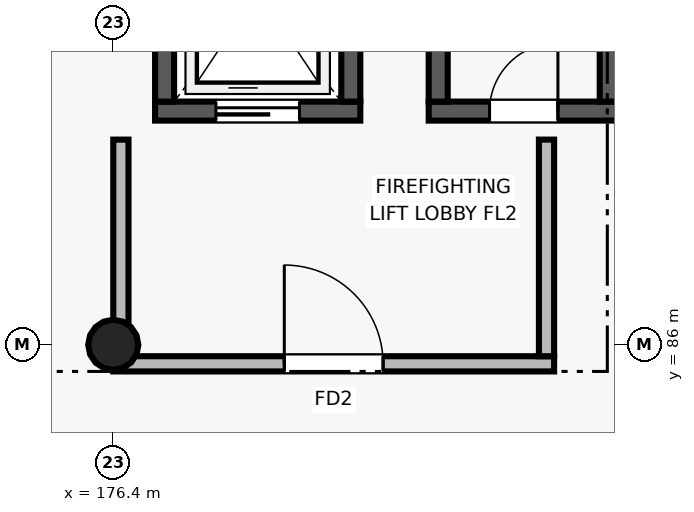
"""IFC4 building model, lengths in metres.
Left out: names, types, materials, properties, quantities, classifications, styles, units other than length and angle.
Written with IfcOpenShell. Run it as: python <this file> out.ifc"""

import sys

from ifc_helpers import new_model, si_unit, direction, frame, frame_2d, origin, origin_2d, place, context, subcontext, project, spatial, rectangle, circle, extrude, element, fill, save


model = new_model("IFC4")
c1 = context("Model", 3, precision=1e-05, world=origin(), true_north=direction((0.0, 1.0)))
c2 = subcontext(c1, "Body", "Model", "MODEL_VIEW")
j1 = project(units=[si_unit("LENGTHUNIT", "METRE"), si_unit("PLANEANGLEUNIT", "RADIAN")], contexts=[c1])
p1 = place(None, origin())
s1 = spatial("IfcSite", under=j1, at=p1, CompositionType="ELEMENT")
p2 = place(p1, origin())
s2 = spatial("IfcBuilding", under=s1, at=p2, CompositionType="ELEMENT")
p3 = place(p2, frame((0.0, 0.0, 9.0)))
s3 = spatial("IfcBuildingStorey", under=s2, at=p3, CompositionType="ELEMENT", Elevation=9.0)
p4 = place(p3, frame((176.4, 86.0, 0.0), z_axis=(0.0, 0.0, 1.0), x_axis=(1.0, 0.0, 0.0)))
e1 = element("IfcColumn", 1, at=p4, inside=s3, PredefinedType="COLUMN", context=c2, shape_type="SweptSolid", body=[
    extrude(circle(Radius=0.33, at=origin_2d()), origin(), (0.0, 0.0, 1.0), 4.2),
])
p5 = place(p3, frame((176.95, 89.075, 0.0), z_axis=(0.0, 0.0, 1.0), x_axis=(1.0, 0.0, 0.0)))
e2 = element("IfcWall", 2, at=p5, inside=s3, PredefinedType="SHEAR", context=c2, shape_type="SweptSolid", body=[
    extrude(rectangle(XDim=2.7, YDim=0.25, at=frame_2d((1.35, 0.0))), origin(), (0.0, 0.0, 1.0), 3.92),
])
p6 = place(p5, frame((0.8, 0.0, 0.0)))
e3 = element("IfcOpeningElement", 3, at=p6, cuts=e2, PredefinedType="OPENING", context=c2, shape_type="SweptSolid", body=[
    extrude(rectangle(XDim=1.1, YDim=2.15, at=frame_2d((0.55, 1.075))), frame((0.0, 0.135, 0.0), z_axis=(0.0, -1.0, 0.0), x_axis=(1.0, 0.0, 0.0)), (0.0, 0.0, 1.0), 0.27),
])
for number, where, z_axis, x_axis in (
    (4, (177.075, 89.2, 0.0), (0.0, 0.0, 1.0), (0.0, 1.0, 0.0)),
    (5, (179.525, 89.2, 0.0), (0.0, 0.0, 1.0), (0.0, 1.0, 0.0)),
):
    element("IfcWall", number, at=place(p3, frame(where, z_axis=z_axis, x_axis=x_axis)), inside=s3, PredefinedType="SHEAR", context=c2, shape_type="SweptSolid", body=[
        extrude(rectangle(XDim=2.9, YDim=0.25, at=frame_2d((1.45, 0.0))), origin(), (0.0, 0.0, 1.0), 3.92),
    ])
p7 = place(p3, frame((176.4, 85.75, 0.0), z_axis=(0.0, 0.0, 1.0), x_axis=(1.0, 0.0, 0.0)))
e6 = element("IfcWall", 6, at=p7, inside=s3, PredefinedType="SOLIDWALL", context=c2, shape_type="SweptSolid", body=[
    extrude(rectangle(XDim=5.8, YDim=0.2, at=frame_2d((2.9, 0.0))), origin(), (0.0, 0.0, 1.0), 3.32),
])
p8 = place(p7, frame((2.25, 0.0, 0.0)))
e7 = element("IfcOpeningElement", 7, at=p8, cuts=e6, PredefinedType="OPENING", context=c2, shape_type="SweptSolid", body=[
    extrude(rectangle(XDim=1.3, YDim=2.2, at=frame_2d((0.65, 1.1))), frame((0.0, 0.11, 0.0), z_axis=(0.0, -1.0, 0.0), x_axis=(1.0, 0.0, 0.0)), (0.0, 0.0, 1.0), 0.22),
])
p9 = place(p3, frame((176.5, 85.85, 0.0), z_axis=(0.0, 0.0, 1.0), x_axis=(0.0, 1.0, 0.0)))
e8 = element("IfcWall", 8, at=p9, inside=s3, PredefinedType="SOLIDWALL", context=c2, shape_type="SweptSolid", body=[
    extrude(rectangle(XDim=2.85, YDim=0.2, at=frame_2d((1.425, 0.0))), origin(), (0.0, 0.0, 1.0), 3.34),
])
p10 = place(p3, frame((182.1, 85.85, 0.0), z_axis=(0.0, 0.0, 1.0), x_axis=(0.0, 1.0, 0.0)))
e9 = element("IfcWall", 9, at=p10, inside=s3, PredefinedType="SOLIDWALL", context=c2, shape_type="SweptSolid", body=[
    extrude(rectangle(XDim=2.85, YDim=0.2, at=frame_2d((1.425, 0.0))), origin(), (0.0, 0.0, 1.0), 3.92),
])
p11 = place(p3, frame((180.55, 89.075, 0.0), z_axis=(0.0, 0.0, 1.0), x_axis=(1.0, 0.0, 0.0)))
e10 = element("IfcWall", 10, at=p11, inside=s3, PredefinedType="SHEAR", context=c2, shape_type="SweptSolid", body=[
    extrude(rectangle(XDim=2.5, YDim=0.25, at=frame_2d((1.25, 0.0))), origin(), (0.0, 0.0, 1.0), 3.92),
])
p12 = place(p11, frame((0.8, 0.0, 0.0)))
e11 = element("IfcOpeningElement", 11, at=p12, cuts=e10, PredefinedType="OPENING", context=c2, shape_type="SweptSolid", body=[
    extrude(rectangle(XDim=0.9, YDim=2.05, at=frame_2d((0.45, 1.025))), frame((0.0, 0.135, 0.0), z_axis=(0.0, -1.0, 0.0), x_axis=(1.0, 0.0, 0.0)), (0.0, 0.0, 1.0), 0.27),
])
for number, where, z_axis, x_axis in (
    (12, (180.675, 89.2, 0.0), (0.0, 0.0, 1.0), (0.0, 1.0, 0.0)),
    (13, (182.925, 89.2, 0.0), (0.0, 0.0, 1.0), (0.0, 1.0, 0.0)),
):
    element("IfcWall", number, at=place(p3, frame(where, z_axis=z_axis, x_axis=x_axis)), inside=s3, PredefinedType="SHEAR", context=c2, shape_type="SweptSolid", body=[
        extrude(rectangle(XDim=2.9, YDim=0.25, at=frame_2d((1.45, 0.0))), origin(), (0.0, 0.0, 1.0), 3.92),
    ])
p13 = place(p8, origin())
e14 = element("IfcDoor", 14, at=p13, inside=s3, OperationType="SINGLE_SWING_LEFT", PredefinedType="DOOR", context=c2, shape_type="SweptSolid", body=[
    extrude(rectangle(XDim=1.3, YDim=2.2, at=frame_2d((0.65, 1.1))), frame((0.0, 0.025, 0.0), z_axis=(0.0, -1.0, 0.0), x_axis=(1.0, 0.0, 0.0)), (0.0, 0.0, 1.0), 0.05),
])
fill(e7, e14)
p14 = place(p12, origin())
e15 = element("IfcDoor", 15, at=p14, inside=s3, OperationType="SINGLE_SWING_RIGHT", PredefinedType="DOOR", context=c2, shape_type="SweptSolid", body=[
    extrude(rectangle(XDim=0.9, YDim=2.05, at=frame_2d((0.45, 1.025))), frame((0.0, 0.025, 0.0), z_axis=(0.0, -1.0, 0.0), x_axis=(1.0, 0.0, 0.0)), (0.0, 0.0, 1.0), 0.05),
])
fill(e11, e15)
p15 = place(p6, origin())
e16 = element("IfcDoor", 16, at=p15, inside=s3, OperationType="SLIDING_TO_LEFT", PredefinedType="DOOR", context=c2, shape_type="SweptSolid", body=[
    extrude(rectangle(XDim=1.1, YDim=2.15, at=frame_2d((0.55, 1.075))), frame((0.0, 0.025, 0.0), z_axis=(0.0, -1.0, 0.0), x_axis=(1.0, 0.0, 0.0)), (0.0, 0.0, 1.0), 0.05),
])
fill(e3, e16)
save(model, sys.argv[1])
